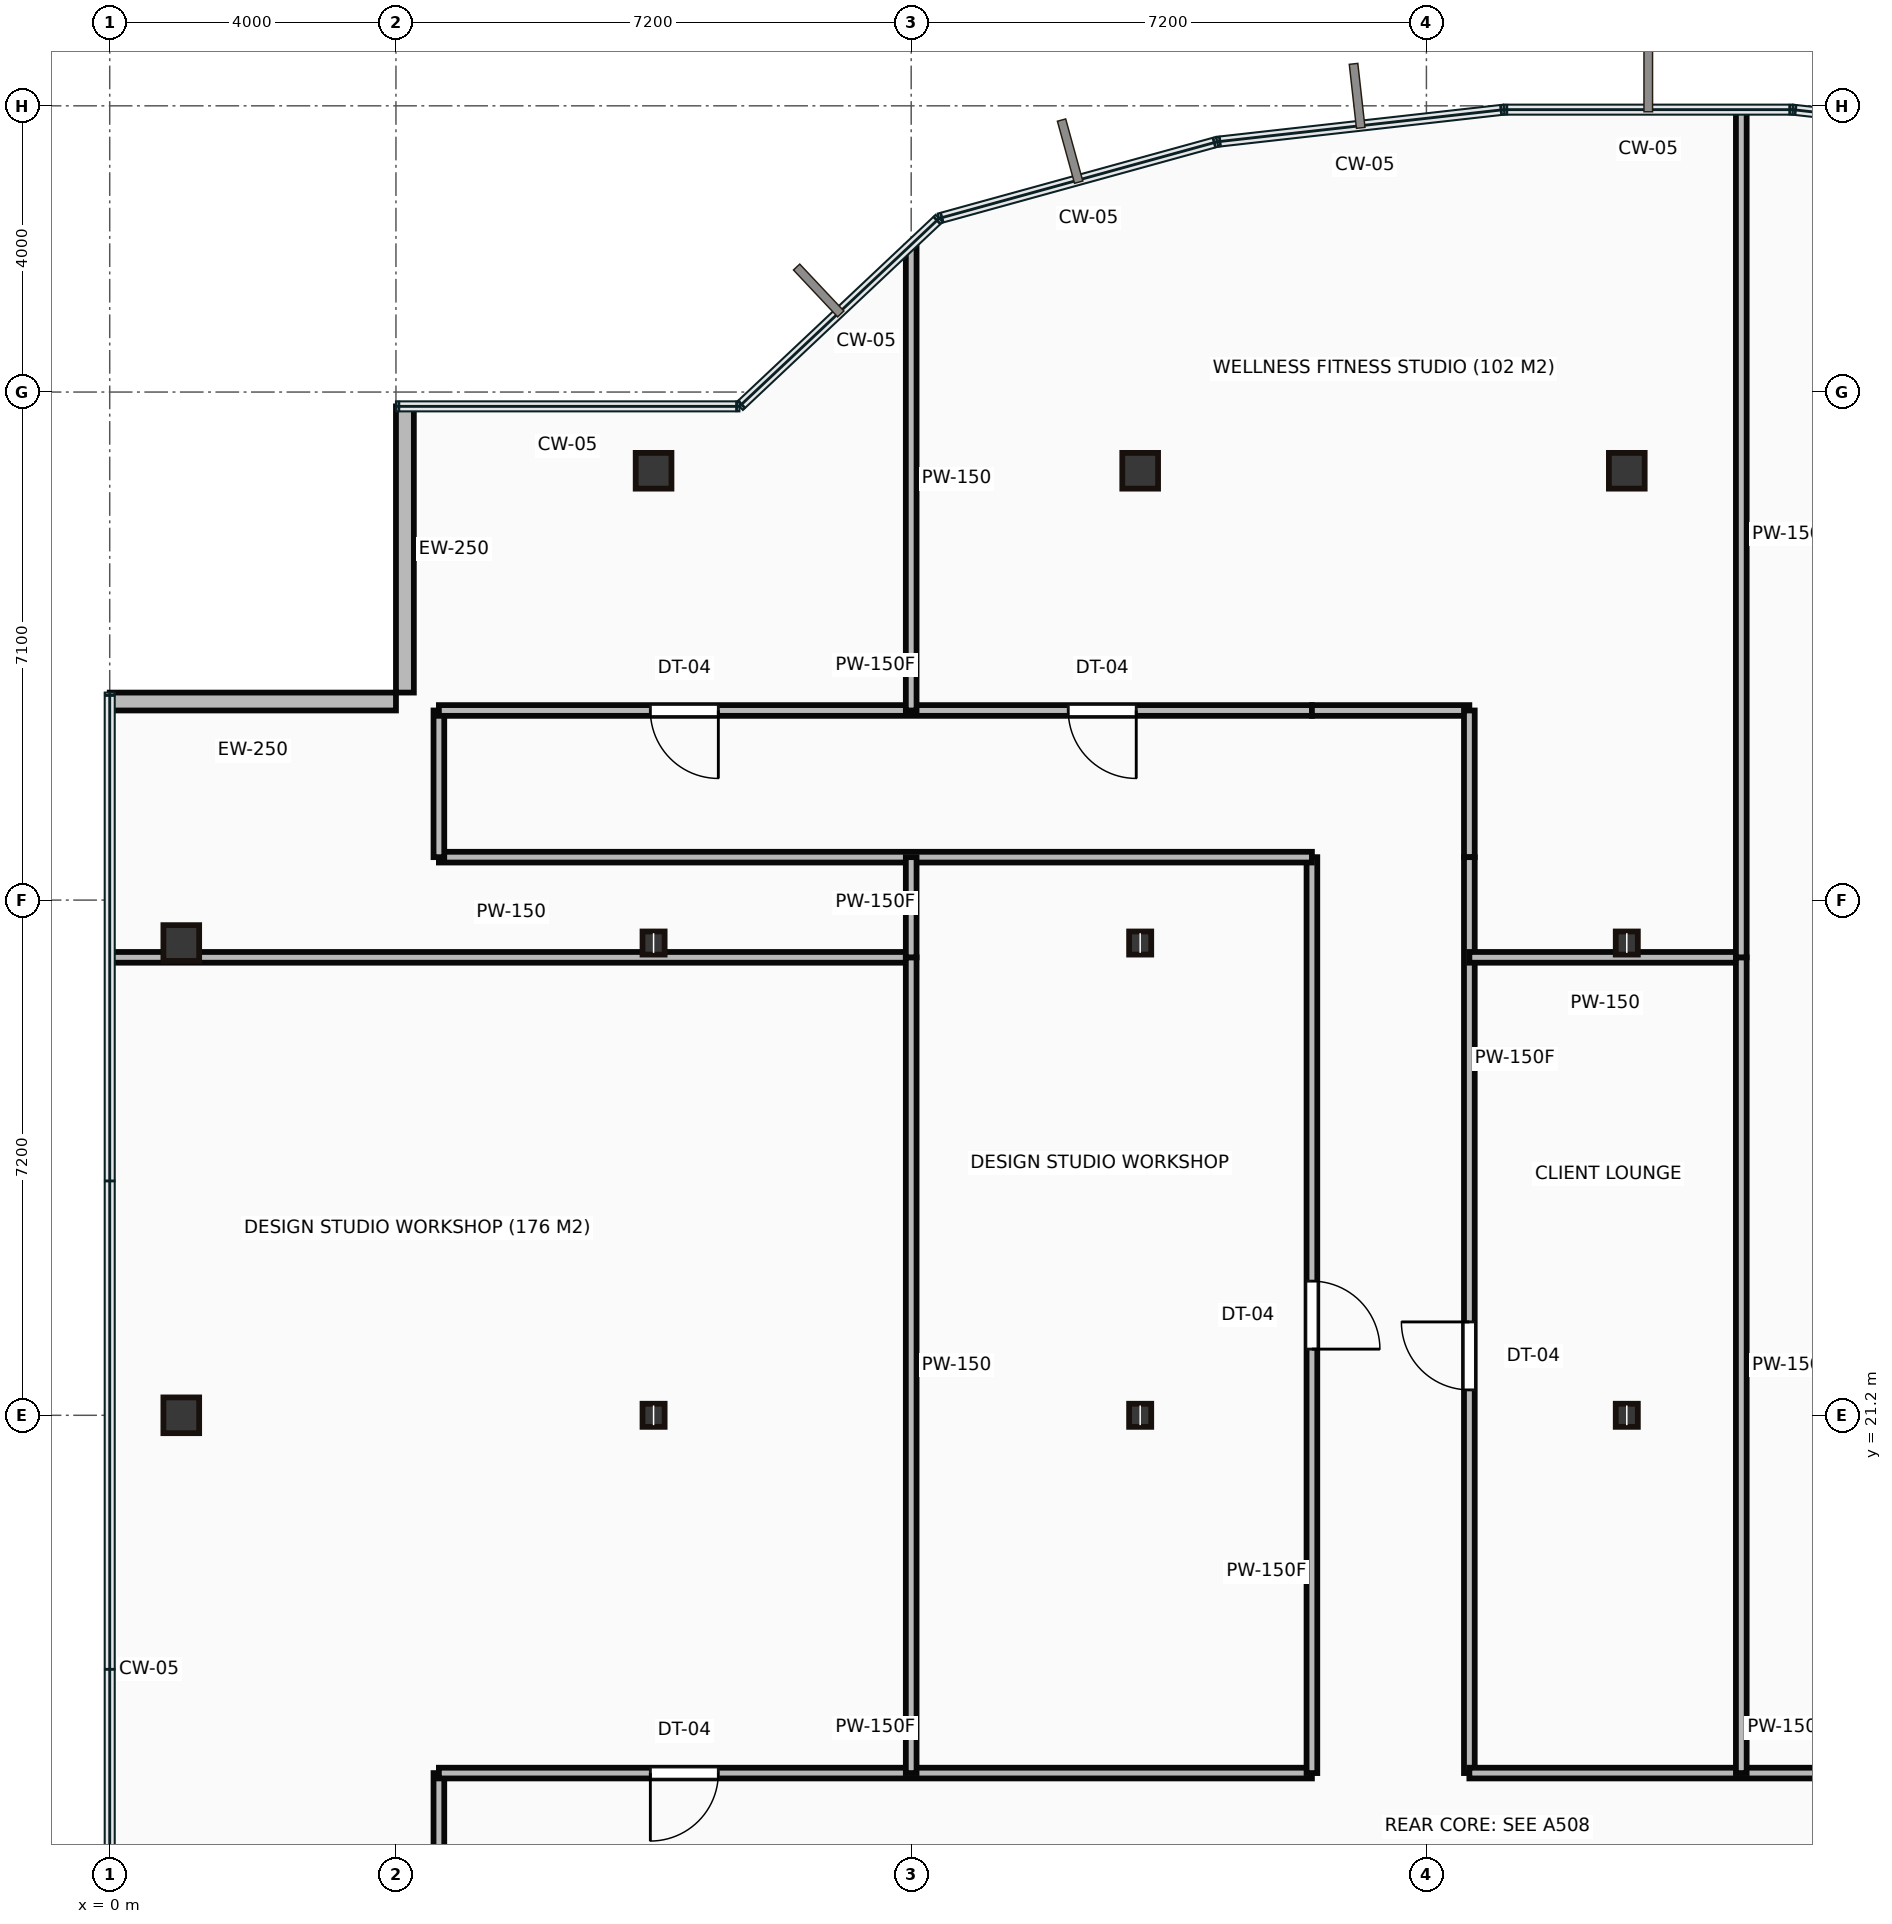
"""IFC4 building model, lengths in metres.
Left out: names, types, materials, properties, quantities, classifications, styles, units other than length and angle.
Written with IfcOpenShell. Run it as: python <this file> out.ifc"""

import sys

from ifc_helpers import new_model, si_unit, direction, frame, frame_2d, origin, origin_2d, place, context, subcontext, project, spatial, rectangle, hollow_rectangle, i_section, extrude, source, transform, mapped, element, fill, save


model = new_model("IFC4")
c1 = context("Model", 3, precision=1e-05, world=origin(), true_north=direction((0.0, 1.0)))
c2 = subcontext(c1, "Body", "Model", "MODEL_VIEW")
j1 = project(units=[si_unit("LENGTHUNIT", "METRE"), si_unit("PLANEANGLEUNIT", "RADIAN")], contexts=[c1])
p1 = place(None, origin())
s1 = spatial("IfcSite", under=j1, at=p1, CompositionType="ELEMENT")
p2 = place(p1, origin())
s2 = spatial("IfcBuilding", under=s1, at=p2, CompositionType="ELEMENT")
p3 = place(p2, frame((0.0, 0.0, 192.25)))
s3 = spatial("IfcBuildingStorey", under=s2, at=p3, CompositionType="ELEMENT", Elevation=192.25)
m1 = source(origin(), c2, "Body", "SweptSolid", [
    extrude(hollow_rectangle(XDim=0.5, YDim=0.5, WallThickness=0.022, at=origin_2d()), origin(), (0.0, 0.0, 1.0), 3.65),
])
for number, where, z_axis, x_axis in (
    (1, (1.0, 21.2, 0.0), (0.0, 0.0, 1.0), (1.0, 0.0, 0.0)),
    (2, (1.0, 27.8, 0.0), (0.0, 0.0, 1.0), (1.0, 0.0, 0.0)),
):
    element("IfcColumn", number, at=place(p3, frame(where, z_axis=z_axis, x_axis=x_axis)), inside=s3, PredefinedType="COLUMN", context=c2, shape_type="MappedRepresentation", body=[
        mapped(m1, transform((0.0, 0.0, 0.0))),
    ])
m2 = source(origin(), c2, "Body", "SweptSolid", [
    extrude(i_section(OverallWidth=0.309, OverallDepth=0.323, WebThickness=0.014, FlangeThickness=0.023, at=origin_2d()), origin(), (0.0, 0.0, 1.0), 3.65),
])
for number, where, z_axis, x_axis in (
    (3, (7.6, 21.2, 0.0), (0.0, 0.0, 1.0), (1.0, 0.0, 0.0)),
    (4, (7.6, 27.8, 0.0), (0.0, 0.0, 1.0), (1.0, 0.0, 0.0)),
):
    element("IfcColumn", number, at=place(p3, frame(where, z_axis=z_axis, x_axis=x_axis)), inside=s3, PredefinedType="COLUMN", context=c2, shape_type="MappedRepresentation", body=[
        mapped(m2, transform((0.0, 0.0, 0.0))),
    ])
p4 = place(p3, frame((7.6, 34.4, 0.0), z_axis=(0.0, 0.0, 1.0), x_axis=(1.0, 0.0, 0.0)))
e5 = element("IfcColumn", 5, at=p4, inside=s3, PredefinedType="COLUMN", context=c2, shape_type="MappedRepresentation", body=[
    mapped(m1, transform((0.0, 0.0, 0.0))),
])
for number, where, z_axis, x_axis in (
    (6, (14.4, 21.2, 0.0), (0.0, 0.0, 1.0), (1.0, 0.0, 0.0)),
    (7, (14.4, 27.8, 0.0), (0.0, 0.0, 1.0), (1.0, 0.0, 0.0)),
):
    element("IfcColumn", number, at=place(p3, frame(where, z_axis=z_axis, x_axis=x_axis)), inside=s3, PredefinedType="COLUMN", context=c2, shape_type="MappedRepresentation", body=[
        mapped(m2, transform((0.0, 0.0, 0.0))),
    ])
p5 = place(p3, frame((14.4, 34.4, 0.0), z_axis=(0.0, 0.0, 1.0), x_axis=(1.0, 0.0, 0.0)))
e8 = element("IfcColumn", 8, at=p5, inside=s3, PredefinedType="COLUMN", context=c2, shape_type="MappedRepresentation", body=[
    mapped(m1, transform((0.0, 0.0, 0.0))),
])
for number, where, z_axis, x_axis in (
    (9, (21.2, 21.2, 0.0), (0.0, 0.0, 1.0), (1.0, 0.0, 0.0)),
    (10, (21.2, 27.8, 0.0), (0.0, 0.0, 1.0), (1.0, 0.0, 0.0)),
):
    element("IfcColumn", number, at=place(p3, frame(where, z_axis=z_axis, x_axis=x_axis)), inside=s3, PredefinedType="COLUMN", context=c2, shape_type="MappedRepresentation", body=[
        mapped(m2, transform((0.0, 0.0, 0.0))),
    ])
p6 = place(p3, frame((21.2, 34.4, 0.0), z_axis=(0.0, 0.0, 1.0), x_axis=(1.0, 0.0, 0.0)))
e11 = element("IfcColumn", 11, at=p6, inside=s3, PredefinedType="COLUMN", context=c2, shape_type="MappedRepresentation", body=[
    mapped(m1, transform((0.0, 0.0, 0.0))),
])
m3 = source(origin(), c2, "Body", "SweptSolid", [
    extrude(rectangle(XDim=4.0, YDim=0.25, at=frame_2d((2.0, 0.0))), origin(), (0.0, 0.0, 1.0), 3.4),
])
for number, where, z_axis, x_axis in (
    (12, (4.125, 35.3, 0.0), (0.0, 0.0, 1.0), (0.0, -1.0, 0.0)),
    (13, (4.0, 31.175, 0.0), (0.0, 0.0, 1.0), (-1.0, 0.0, 0.0)),
):
    element("IfcWall", number, at=place(p3, frame(where, z_axis=z_axis, x_axis=x_axis)), inside=s3, PredefinedType="STANDARD", context=c2, shape_type="MappedRepresentation", body=[
        mapped(m3, transform((0.0, 0.0, 0.0))),
    ])
m4 = source(origin(), c2, "Body", "SweptSolid", [
    extrude(rectangle(XDim=2.12, YDim=0.15, at=frame_2d((1.06, 0.0))), origin(), (0.0, 0.0, 1.0), 3.4),
])
p7 = place(p3, frame((4.6, 14.08, 0.0), z_axis=(0.0, 0.0, 1.0), x_axis=(0.0, 1.0, 0.0)))
e14 = element("IfcWall", 14, at=p7, inside=s3, PredefinedType="PARTITIONING", context=c2, shape_type="MappedRepresentation", body=[
    mapped(m4, transform((0.0, 0.0, 0.0))),
])
m5 = source(origin(), c2, "Body", "SweptSolid", [
    extrude(rectangle(XDim=12.2, YDim=0.15, at=frame_2d((6.1, 0.0))), origin(), (0.0, 0.0, 1.0), 3.4),
])
p8 = place(p3, frame((4.6, 16.2, 0.0), z_axis=(0.0, 0.0, 1.0), x_axis=(1.0, 0.0, 0.0)))
e15 = element("IfcWall", 15, at=p8, inside=s3, PredefinedType="PARTITIONING", context=c2, shape_type="MappedRepresentation", body=[
    mapped(m5, transform((0.0, 0.0, 0.0))),
])
p9 = place(p8, frame((2.955, 0.0, 0.0)))
e16 = element("IfcOpeningElement", 16, at=p9, cuts=e15, PredefinedType="OPENING", context=c2, shape_type="SweptSolid", body=[
    extrude(rectangle(XDim=0.95, YDim=2.15, at=frame_2d((0.475, 1.075))), frame((0.0, 0.085, 0.0), z_axis=(0.0, -1.0, 0.0), x_axis=(1.0, 0.0, 0.0)), (0.0, 0.0, 1.0), 0.17),
])
m6 = source(origin(), c2, "Body", "SweptSolid", [
    extrude(rectangle(XDim=12.8, YDim=0.15, at=frame_2d((6.4, 0.0))), origin(), (0.0, 0.0, 1.0), 3.4),
])
p10 = place(p3, frame((16.8, 16.2, 0.0), z_axis=(0.0, 0.0, 1.0), x_axis=(0.0, 1.0, 0.0)))
e17 = element("IfcWall", 17, at=p10, inside=s3, PredefinedType="PARTITIONING", context=c2, shape_type="MappedRepresentation", body=[
    mapped(m6, transform((0.0, 0.0, 0.0))),
])
p11 = place(p10, frame((5.925, 0.0, 0.0)))
e18 = element("IfcOpeningElement", 18, at=p11, cuts=e17, PredefinedType="OPENING", context=c2, shape_type="SweptSolid", body=[
    extrude(rectangle(XDim=0.95, YDim=2.15, at=frame_2d((0.475, 1.075))), frame((0.0, 0.085, 0.0), z_axis=(0.0, -1.0, 0.0), x_axis=(1.0, 0.0, 0.0)), (0.0, 0.0, 1.0), 0.17),
])
p12 = place(p3, frame((16.8, 29.0, 0.0), z_axis=(0.0, 0.0, 1.0), x_axis=(-1.0, 0.0, 0.0)))
e19 = element("IfcWall", 19, at=p12, inside=s3, PredefinedType="PARTITIONING", context=c2, shape_type="MappedRepresentation", body=[
    mapped(m5, transform((0.0, 0.0, 0.0))),
])
m7 = source(origin(), c2, "Body", "SweptSolid", [
    extrude(rectangle(XDim=2.05, YDim=0.15, at=frame_2d((1.025, 0.0))), origin(), (0.0, 0.0, 1.0), 3.4),
])
p13 = place(p3, frame((4.6, 29.0, 0.0), z_axis=(0.0, 0.0, 1.0), x_axis=(0.0, 1.0, 0.0)))
e20 = element("IfcWall", 20, at=p13, inside=s3, PredefinedType="PARTITIONING", context=c2, shape_type="MappedRepresentation", body=[
    mapped(m7, transform((0.0, 0.0, 0.0))),
])
p14 = place(p3, frame((4.6, 31.05, 0.0), z_axis=(0.0, 0.0, 1.0), x_axis=(1.0, 0.0, 0.0)))
e21 = element("IfcWall", 21, at=p14, inside=s3, PredefinedType="PARTITIONING", context=c2, shape_type="MappedRepresentation", body=[
    mapped(m5, transform((0.0, 0.0, 0.0))),
])
p15 = place(p14, frame((2.955, 0.0, 0.0)))
e22 = element("IfcOpeningElement", 22, at=p15, cuts=e21, PredefinedType="OPENING", context=c2, shape_type="SweptSolid", body=[
    extrude(rectangle(XDim=0.95, YDim=2.15, at=frame_2d((0.475, 1.075))), frame((0.0, 0.085, 0.0), z_axis=(0.0, -1.0, 0.0), x_axis=(1.0, 0.0, 0.0)), (0.0, 0.0, 1.0), 0.17),
])
p16 = place(p14, frame((8.795, 0.0, 0.0)))
e23 = element("IfcOpeningElement", 23, at=p16, cuts=e21, PredefinedType="OPENING", context=c2, shape_type="SweptSolid", body=[
    extrude(rectangle(XDim=0.95, YDim=2.15, at=frame_2d((0.475, 1.075))), frame((0.0, 0.085, 0.0), z_axis=(0.0, -1.0, 0.0), x_axis=(1.0, 0.0, 0.0)), (0.0, 0.0, 1.0), 0.17),
])
m8 = source(origin(), c2, "Body", "SweptSolid", [
    extrude(rectangle(XDim=2.2, YDim=0.15, at=frame_2d((1.1, 0.0))), origin(), (0.0, 0.0, 1.0), 3.4),
])
p17 = place(p3, frame((16.8, 31.05, 0.0), z_axis=(0.0, 0.0, 1.0), x_axis=(1.0, 0.0, 0.0)))
e24 = element("IfcWall", 24, at=p17, inside=s3, PredefinedType="PARTITIONING", context=c2, shape_type="MappedRepresentation", body=[
    mapped(m8, transform((0.0, 0.0, 0.0))),
])
p18 = place(p3, frame((19.0, 31.05, 0.0), z_axis=(0.0, 0.0, 1.0), x_axis=(0.0, -1.0, 0.0)))
e25 = element("IfcWall", 25, at=p18, inside=s3, PredefinedType="PARTITIONING", context=c2, shape_type="MappedRepresentation", body=[
    mapped(m7, transform((0.0, 0.0, 0.0))),
])
p19 = place(p3, frame((19.0, 29.0, 0.0), z_axis=(0.0, 0.0, 1.0), x_axis=(0.0, -1.0, 0.0)))
e26 = element("IfcWall", 26, at=p19, inside=s3, PredefinedType="PARTITIONING", context=c2, shape_type="MappedRepresentation", body=[
    mapped(m6, transform((0.0, 0.0, 0.0))),
])
p20 = place(p19, frame((6.495, 0.0, 0.0)))
e27 = element("IfcOpeningElement", 27, at=p20, cuts=e26, PredefinedType="OPENING", context=c2, shape_type="SweptSolid", body=[
    extrude(rectangle(XDim=0.95, YDim=2.15, at=frame_2d((0.475, 1.075))), frame((0.0, 0.085, 0.0), z_axis=(0.0, -1.0, 0.0), x_axis=(1.0, 0.0, 0.0)), (0.0, 0.0, 1.0), 0.17),
])
m9 = source(origin(), c2, "Body", "SweptSolid", [
    extrude(rectangle(XDim=20.2, YDim=0.15, at=frame_2d((10.1, 0.0))), origin(), (0.0, 0.0, 1.0), 3.4),
])
p21 = place(p3, frame((19.0, 16.2, 0.0), z_axis=(0.0, 0.0, 1.0), x_axis=(1.0, 0.0, 0.0)))
e28 = element("IfcWall", 28, at=p21, inside=s3, PredefinedType="PARTITIONING", context=c2, shape_type="MappedRepresentation", body=[
    mapped(m9, transform((0.0, 0.0, 0.0))),
])
p22 = place(p21, frame((9.625, 0.0, 0.0)))
e29 = element("IfcOpeningElement", 29, at=p22, cuts=e28, PredefinedType="OPENING", context=c2, shape_type="SweptSolid", body=[
    extrude(rectangle(XDim=0.95, YDim=2.15, at=frame_2d((0.475, 1.075))), frame((0.0, 0.085, 0.0), z_axis=(0.0, -1.0, 0.0), x_axis=(1.0, 0.0, 0.0)), (0.0, 0.0, 1.0), 0.17),
])
p23 = place(p21, frame((17.695, 0.0, 0.0)))
e30 = element("IfcOpeningElement", 30, at=p23, cuts=e28, PredefinedType="OPENING", context=c2, shape_type="SweptSolid", body=[
    extrude(rectangle(XDim=0.95, YDim=2.15, at=frame_2d((0.475, 1.075))), frame((0.0, 0.085, 0.0), z_axis=(0.0, -1.0, 0.0), x_axis=(1.0, 0.0, 0.0)), (0.0, 0.0, 1.0), 0.17),
])
m10 = source(origin(), c2, "Body", "SweptSolid", [
    extrude(rectangle(XDim=11.18, YDim=0.15, at=frame_2d((5.59, 0.0))), origin(), (0.0, 0.0, 1.0), 3.4),
])
p24 = place(p3, frame((0.02, 27.6, 0.0), z_axis=(0.0, 0.0, 1.0), x_axis=(1.0, 0.0, 0.0)))
e31 = element("IfcWall", 31, at=p24, inside=s3, PredefinedType="PARTITIONING", context=c2, shape_type="MappedRepresentation", body=[
    mapped(m10, transform((0.0, 0.0, 0.0))),
])
m11 = source(origin(), c2, "Body", "SweptSolid", [
    extrude(rectangle(XDim=11.4, YDim=0.15, at=frame_2d((5.7, 0.0))), origin(), (0.0, 0.0, 1.0), 3.4),
])
p25 = place(p3, frame((11.2, 27.6, 0.0), z_axis=(0.0, 0.0, 1.0), x_axis=(0.0, -1.0, 0.0)))
e32 = element("IfcWall", 32, at=p25, inside=s3, PredefinedType="PARTITIONING", context=c2, shape_type="MappedRepresentation", body=[
    mapped(m11, transform((0.0, 0.0, 0.0))),
])
m12 = source(origin(), c2, "Body", "SweptSolid", [
    extrude(rectangle(XDim=1.4, YDim=0.15, at=frame_2d((0.7, 0.0))), origin(), (0.0, 0.0, 1.0), 3.4),
])
p26 = place(p3, frame((11.2, 29.0, 0.0), z_axis=(0.0, 0.0, 1.0), x_axis=(0.0, -1.0, 0.0)))
e33 = element("IfcWall", 33, at=p26, inside=s3, PredefinedType="PARTITIONING", context=c2, shape_type="MappedRepresentation", body=[
    mapped(m12, transform((0.0, 0.0, 0.0))),
])
m13 = source(origin(), c2, "Body", "SweptSolid", [
    extrude(rectangle(XDim=6.482, YDim=0.15, at=frame_2d((3.241, 0.0))), origin(), (0.0, 0.0, 1.0), 3.4),
])
p27 = place(p3, frame((11.2, 37.532, 0.0), z_axis=(0.0, 0.0, 1.0), x_axis=(0.0, -1.0, 0.0)))
e34 = element("IfcWall", 34, at=p27, inside=s3, PredefinedType="PARTITIONING", context=c2, shape_type="MappedRepresentation", body=[
    mapped(m13, transform((0.0, 0.0, 0.0))),
])
m14 = source(origin(), c2, "Body", "SweptSolid", [
    extrude(rectangle(XDim=3.8, YDim=0.15, at=frame_2d((1.9, 0.0))), origin(), (0.0, 0.0, 1.0), 3.4),
])
p28 = place(p3, frame((22.8, 27.6, 0.0), z_axis=(0.0, 0.0, 1.0), x_axis=(-1.0, 0.0, 0.0)))
e35 = element("IfcWall", 35, at=p28, inside=s3, PredefinedType="PARTITIONING", context=c2, shape_type="MappedRepresentation", body=[
    mapped(m14, transform((0.0, 0.0, 0.0))),
])
p29 = place(p3, frame((22.8, 27.6, 0.0), z_axis=(0.0, 0.0, 1.0), x_axis=(0.0, -1.0, 0.0)))
e36 = element("IfcWall", 36, at=p29, inside=s3, PredefinedType="PARTITIONING", context=c2, shape_type="MappedRepresentation", body=[
    mapped(m11, transform((0.0, 0.0, 0.0))),
])
m15 = source(origin(), c2, "Body", "SweptSolid", [
    extrude(rectangle(XDim=11.827, YDim=0.15, at=frame_2d((5.913, 0.0))), origin(), (0.0, 0.0, 1.0), 3.4),
])
p30 = place(p3, frame((22.8, 39.427, 0.0), z_axis=(0.0, 0.0, 1.0), x_axis=(0.0, -1.0, 0.0)))
e37 = element("IfcWall", 37, at=p30, inside=s3, PredefinedType="PARTITIONING", context=c2, shape_type="MappedRepresentation", body=[
    mapped(m15, transform((0.0, 0.0, 0.0))),
])
m16 = source(origin(), c2, "Body", "SweptSolid", [
    extrude(rectangle(XDim=0.95, YDim=2.15, at=frame_2d((0.475, 1.075))), frame((0.0, 0.025, 0.0), z_axis=(0.0, -1.0, 0.0), x_axis=(1.0, 0.0, 0.0)), (0.0, 0.0, 1.0), 0.05),
])
p31 = place(p9, origin())
e38 = element("IfcDoor", 38, at=p31, inside=s3, OperationType="SINGLE_SWING_LEFT", PredefinedType="DOOR", context=c2, shape_type="MappedRepresentation", body=[
    mapped(m16, transform((0.0, 0.0, 0.0))),
])
fill(e16, e38)
p32 = place(p15, origin())
e39 = element("IfcDoor", 39, at=p32, inside=s3, OperationType="SINGLE_SWING_RIGHT", PredefinedType="DOOR", context=c2, shape_type="MappedRepresentation", body=[
    mapped(m16, transform((0.0, 0.0, 0.0))),
])
fill(e22, e39)
p33 = place(p11, origin())
e40 = element("IfcDoor", 40, at=p33, inside=s3, OperationType="SINGLE_SWING_LEFT", PredefinedType="DOOR", context=c2, shape_type="MappedRepresentation", body=[
    mapped(m16, transform((0.0, 0.0, 0.0))),
])
fill(e18, e40)
p34 = place(p16, origin())
e41 = element("IfcDoor", 41, at=p34, inside=s3, OperationType="SINGLE_SWING_RIGHT", PredefinedType="DOOR", context=c2, shape_type="MappedRepresentation", body=[
    mapped(m16, transform((0.0, 0.0, 0.0))),
])
fill(e23, e41)
p35 = place(p20, origin())
e42 = element("IfcDoor", 42, at=p35, inside=s3, OperationType="SINGLE_SWING_LEFT", PredefinedType="DOOR", context=c2, shape_type="MappedRepresentation", body=[
    mapped(m16, transform((0.0, 0.0, 0.0))),
])
fill(e27, e42)
save(model, sys.argv[1])
